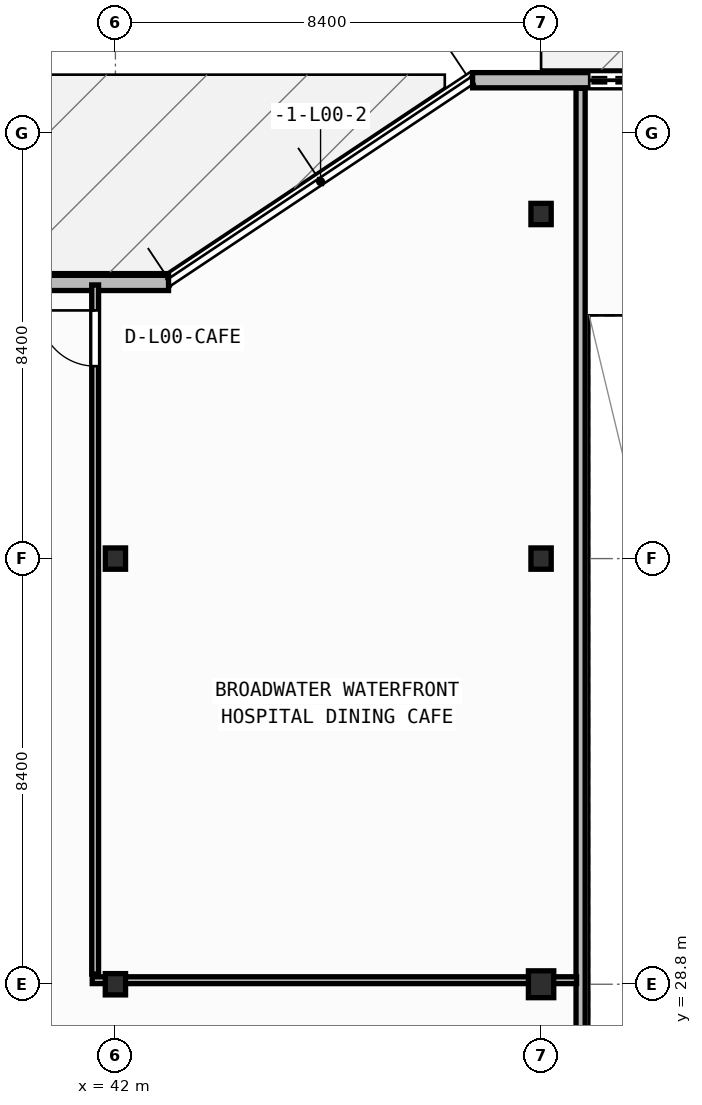
"""IFC4 building model, lengths in metres.
Left out: names, types, materials, properties, quantities, classifications, styles, units other than length and angle.
Written with IfcOpenShell. Run it as: python <this file> out.ifc"""

import sys

from ifc_helpers import new_model, si_unit, direction, frame, frame_2d, origin, origin_2d, place, context, subcontext, project, spatial, rectangle, i_section, extrude, element, fill, save


model = new_model("IFC4")
c1 = context("Model", 3, precision=1e-05, world=origin(), true_north=direction((0.0, 1.0)))
c2 = subcontext(c1, "Body", "Model", "MODEL_VIEW")
j1 = project(units=[si_unit("LENGTHUNIT", "METRE"), si_unit("PLANEANGLEUNIT", "RADIAN")], contexts=[c1])
p1 = place(None, origin())
s1 = spatial("IfcSite", under=j1, at=p1, CompositionType="ELEMENT")
p2 = place(p1, origin())
s2 = spatial("IfcBuilding", under=s1, at=p2, CompositionType="ELEMENT")
p3 = place(p2, origin())
s3 = spatial("IfcBuildingStorey", under=s2, at=p3, CompositionType="ELEMENT", Elevation=0.0)
p4 = place(p3, frame((42.0, 28.8, 0.0), z_axis=(0.0, 0.0, 1.0), x_axis=(1.0, 0.0, 0.0)))
e1 = element("IfcColumn", 1, at=p4, inside=s3, PredefinedType="COLUMN", context=c2, shape_type="SweptSolid", body=[
    extrude(i_section(OverallWidth=0.4, OverallDepth=0.42, WebThickness=0.025, FlangeThickness=0.04, at=origin_2d()), origin(), (0.0, 0.0, 1.0), 4.5),
])
p5 = place(p3, frame((50.4, 28.8, 0.0), z_axis=(0.0, 0.0, 1.0), x_axis=(1.0, 0.0, 0.0)))
e2 = element("IfcColumn", 2, at=p5, inside=s3, PredefinedType="COLUMN", context=c2, shape_type="SweptSolid", body=[
    extrude(i_section(OverallWidth=0.5, OverallDepth=0.53, WebThickness=0.028, FlangeThickness=0.045, at=origin_2d()), origin(), (0.0, 0.0, 1.0), 4.5),
])
for number, where, z_axis, x_axis in (
    (3, (42.0, 37.2, 0.0), (0.0, 0.0, 1.0), (1.0, 0.0, 0.0)),
    (4, (50.4, 37.2, 0.0), (0.0, 0.0, 1.0), (1.0, 0.0, 0.0)),
    (5, (50.4, 44.0, 0.0), (0.0, 0.0, 1.0), (1.0, 0.0, 0.0)),
):
    element("IfcColumn", number, at=place(p3, frame(where, z_axis=z_axis, x_axis=x_axis)), inside=s3, PredefinedType="COLUMN", context=c2, shape_type="SweptSolid", body=[
        extrude(i_section(OverallWidth=0.4, OverallDepth=0.42, WebThickness=0.025, FlangeThickness=0.04, at=origin_2d()), origin(), (0.0, 0.0, 1.0), 4.5),
    ])
p6 = place(p3, frame((85.44, 46.64, 0.0), z_axis=(0.0, 0.0, 1.0), x_axis=(-1.0, 0.0, 0.0)))
e6 = element("IfcWall", 6, at=p6, inside=s3, PredefinedType="STANDARD", context=c2, shape_type="SweptSolid", body=[
    extrude(rectangle(XDim=36.392, YDim=0.3, at=frame_2d((18.196, 0.0))), origin(), (0.0, 0.0, 1.0), 4.25),
])
p7 = place(p6, frame((27.59, 0.0, 0.0)))
e7 = element("IfcOpeningElement", 7, at=p7, cuts=e6, PredefinedType="OPENING", context=c2, shape_type="SweptSolid", body=[
    extrude(rectangle(XDim=6.5, YDim=3.6, at=frame_2d((3.25, 1.8))), frame((0.0, 0.16, 0.0), z_axis=(0.0, -1.0, 0.0), x_axis=(1.0, 0.0, 0.0)), (0.0, 0.0, 1.0), 0.32),
])
p8 = place(p6, frame((4.04, 0.0, 0.85)))
e8 = element("IfcOpeningElement", 8, at=p8, cuts=e6, PredefinedType="OPENING", context=c2, shape_type="SweptSolid", body=[
    extrude(rectangle(XDim=2.8, YDim=2.1, at=frame_2d((1.4, 1.05))), frame((0.0, 0.16, 0.0), z_axis=(0.0, -1.0, 0.0), x_axis=(1.0, 0.0, 0.0)), (0.0, 0.0, 1.0), 0.32),
])
p9 = place(p6, frame((15.585, 0.0, 0.85)))
e9 = element("IfcOpeningElement", 9, at=p9, cuts=e6, PredefinedType="OPENING", context=c2, shape_type="SweptSolid", body=[
    extrude(rectangle(XDim=2.8, YDim=2.1, at=frame_2d((1.4, 1.05))), frame((0.0, 0.16, 0.0), z_axis=(0.0, -1.0, 0.0), x_axis=(1.0, 0.0, 0.0)), (0.0, 0.0, 1.0), 0.32),
])
p10 = place(p6, frame((21.04, 0.0, 0.85)))
e10 = element("IfcOpeningElement", 10, at=p10, cuts=e6, PredefinedType="OPENING", context=c2, shape_type="SweptSolid", body=[
    extrude(rectangle(XDim=2.8, YDim=2.1, at=frame_2d((1.4, 1.05))), frame((0.0, 0.16, 0.0), z_axis=(0.0, -1.0, 0.0), x_axis=(1.0, 0.0, 0.0)), (0.0, 0.0, 1.0), 0.32),
])
p11 = place(p3, frame((24.952, 42.64, 0.0), z_axis=(0.0, 0.0, 1.0), x_axis=(1.0, 0.0, 0.0)))
e11 = element("IfcWall", 11, at=p11, inside=s3, PredefinedType="STANDARD", context=c2, shape_type="SweptSolid", body=[
    extrude(rectangle(XDim=18.097, YDim=0.3, at=frame_2d((9.048, 0.0))), origin(), (0.0, 0.0, 1.0), 4.25),
])
p12 = place(p11, frame((3.343, 0.0, 0.0)))
e12 = element("IfcOpeningElement", 12, at=p12, cuts=e11, PredefinedType="OPENING", context=c2, shape_type="SweptSolid", body=[
    extrude(rectangle(XDim=2.0, YDim=2.3, at=frame_2d((1.0, 1.15))), frame((0.0, 0.16, 0.0), z_axis=(0.0, -1.0, 0.0), x_axis=(1.0, 0.0, 0.0)), (0.0, 0.0, 1.0), 0.32),
])
p13 = place(p11, frame((12.754, 0.0, 0.0)))
e13 = element("IfcOpeningElement", 13, at=p13, cuts=e11, PredefinedType="OPENING", context=c2, shape_type="SweptSolid", body=[
    extrude(rectangle(XDim=2.0, YDim=2.3, at=frame_2d((1.0, 1.15))), frame((0.0, 0.16, 0.0), z_axis=(0.0, -1.0, 0.0), x_axis=(1.0, 0.0, 0.0)), (0.0, 0.0, 1.0), 0.32),
])
p14 = place(p3, frame((51.18, 14.97, 0.0), z_axis=(0.0, 0.0, 1.0), x_axis=(0.0, 1.0, 0.0)))
e14 = element("IfcWall", 14, at=p14, inside=s3, PredefinedType="PARTITIONING", context=c2, shape_type="SweptSolid", body=[
    extrude(rectangle(XDim=31.51, YDim=0.18, at=frame_2d((15.755, 0.0))), origin(), (0.0, 0.0, 1.0), 4.25),
])
p15 = place(p3, frame((41.6, 29.0, 0.0), z_axis=(0.0, 0.0, 1.0), x_axis=(0.0, 1.0, 0.0)))
e15 = element("IfcWall", 15, at=p15, inside=s3, PredefinedType="PARTITIONING", context=c2, shape_type="SweptSolid", body=[
    extrude(rectangle(XDim=13.6, YDim=0.135, at=frame_2d((6.8, 0.0))), origin(), (0.0, 0.0, 1.0), 3.623),
])
p16 = place(p15, frame((11.998, 0.0, 0.0)))
e16 = element("IfcOpeningElement", 16, at=p16, cuts=e15, PredefinedType="OPENING", context=c2, shape_type="SweptSolid", body=[
    extrude(rectangle(XDim=1.1, YDim=2.1, at=frame_2d((0.55, 1.05))), frame((0.0, 0.077, 0.0), z_axis=(0.0, -1.0, 0.0), x_axis=(1.0, 0.0, 0.0)), (0.0, 0.0, 1.0), 0.155),
])
p17 = place(p3, frame((51.1, 28.88, 0.0), z_axis=(0.0, 0.0, 1.0), x_axis=(-1.0, 0.0, 0.0)))
e17 = element("IfcWall", 17, at=p17, inside=s3, PredefinedType="PARTITIONING", context=c2, shape_type="SweptSolid", body=[
    extrude(rectangle(XDim=9.558, YDim=0.135, at=frame_2d((4.779, 0.0))), origin(), (0.0, 0.0, 1.0), 3.425),
])
p18 = place(p7, origin())
e18 = element("IfcDoor", 18, at=p18, inside=s3, OperationType="ROLLINGUP", PredefinedType="GATE", context=c2, shape_type="SweptSolid", body=[
    extrude(rectangle(XDim=6.5, YDim=3.6, at=frame_2d((3.25, 1.8))), frame((0.0, 0.025, 0.0), z_axis=(0.0, -1.0, 0.0), x_axis=(1.0, 0.0, 0.0)), (0.0, 0.0, 1.0), 0.05),
])
fill(e7, e18)
p19 = place(p16, origin())
e19 = element("IfcDoor", 19, at=p19, inside=s3, OperationType="SINGLE_SWING_RIGHT", PredefinedType="DOOR", context=c2, shape_type="SweptSolid", body=[
    extrude(rectangle(XDim=1.1, YDim=2.1, at=frame_2d((0.55, 1.05))), frame((0.0, 0.025, 0.0), z_axis=(0.0, -1.0, 0.0), x_axis=(1.0, 0.0, 0.0)), (0.0, 0.0, 1.0), 0.05),
])
fill(e16, e19)
save(model, sys.argv[1])
